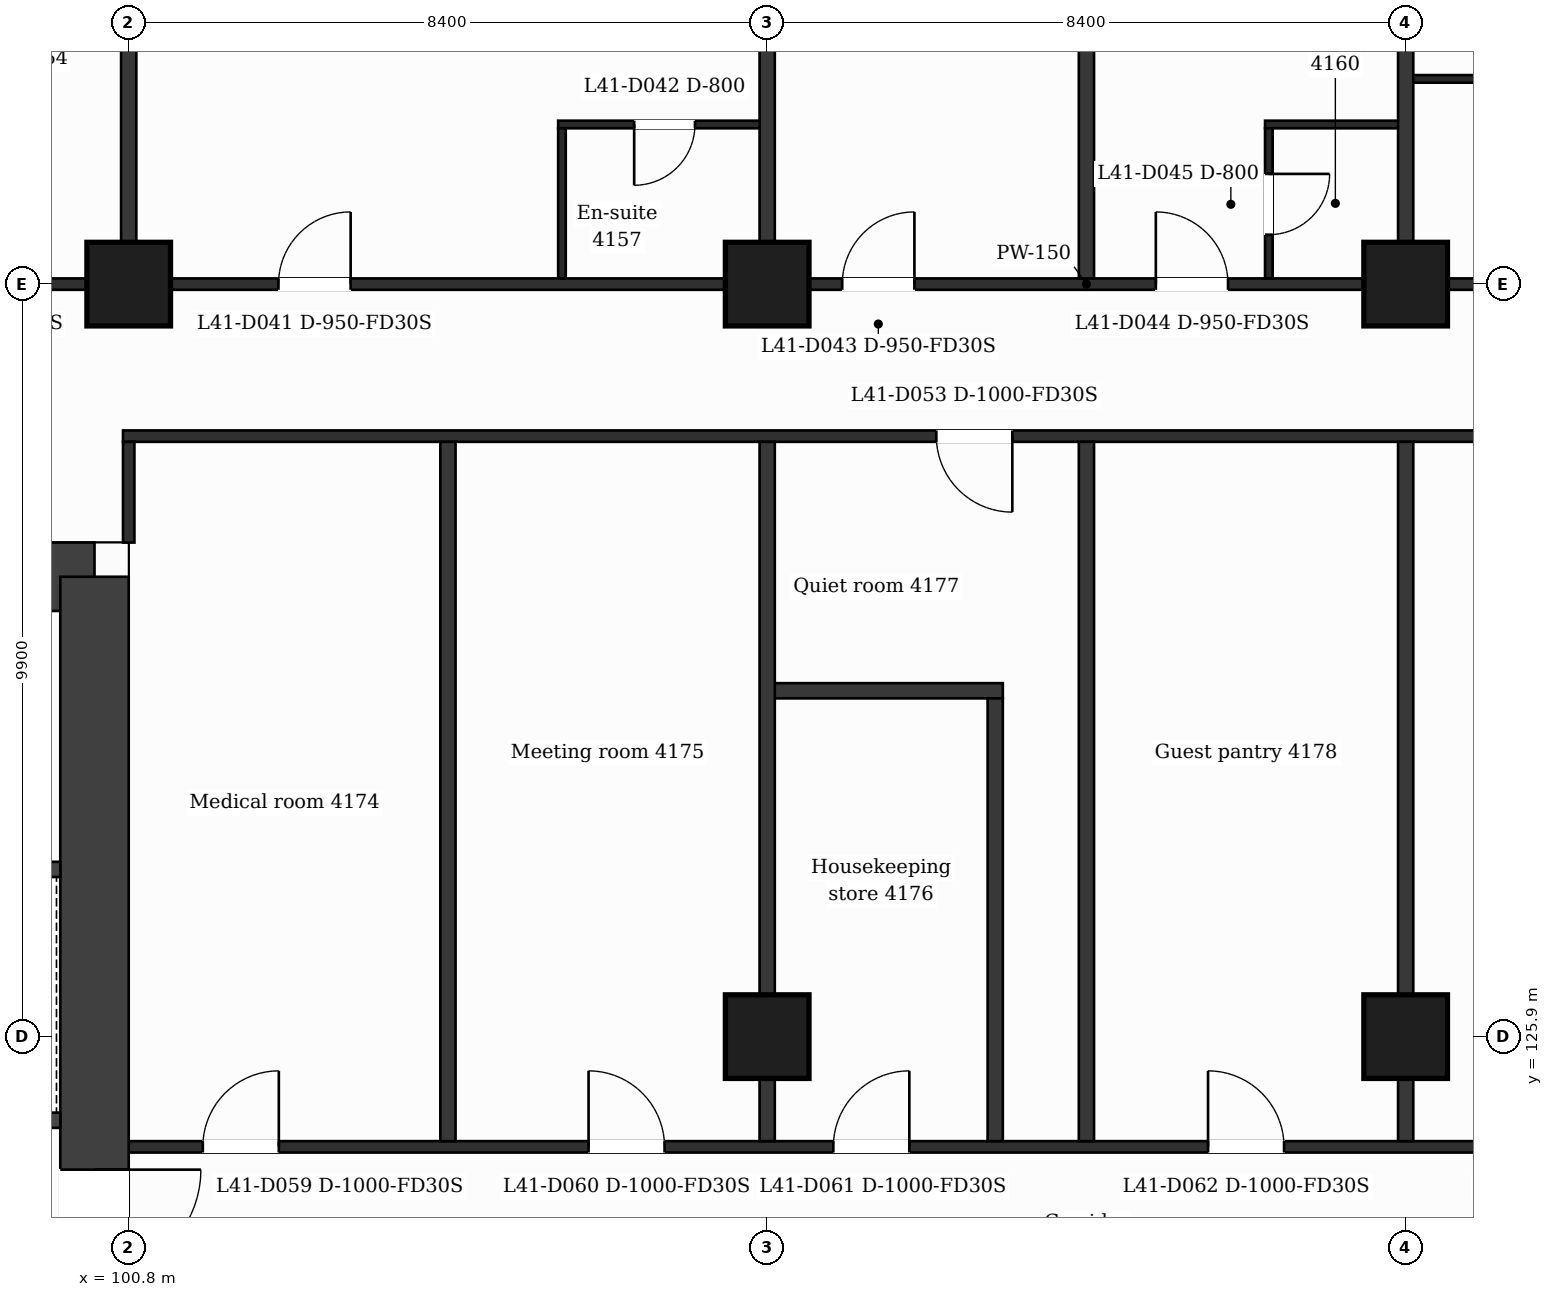
"""IFC4 building model, lengths in metres.
Left out: names, types, materials, properties, quantities, classifications, styles, units other than length and angle.
Written with IfcOpenShell. Run it as: python <this file> out.ifc"""

import sys

from ifc_helpers import new_model, si_unit, direction, frame, frame_2d, origin, origin_2d, place, context, subcontext, project, spatial, rectangle, extrude, element, fill, save


model = new_model("IFC4")
c1 = context("Model", 3, precision=1e-05, world=origin(), true_north=direction((0.0, 1.0)))
c2 = subcontext(c1, "Body", "Model", "MODEL_VIEW")
j1 = project(units=[si_unit("LENGTHUNIT", "METRE"), si_unit("PLANEANGLEUNIT", "RADIAN")], contexts=[c1])
p1 = place(None, origin())
s1 = spatial("IfcSite", under=j1, at=p1, CompositionType="ELEMENT")
p2 = place(p1, origin())
s2 = spatial("IfcBuilding", under=s1, at=p2, CompositionType="ELEMENT")
p3 = place(p2, frame((0.0, 0.0, 173.7)))
s3 = spatial("IfcBuildingStorey", under=s2, at=p3, CompositionType="ELEMENT", Elevation=173.7)
p4 = place(p3, frame((89.024, 131.95, 0.0), z_axis=(0.0, 0.0, 1.0), x_axis=(1.0, 0.0, 0.0)))
e1 = element("IfcWall", 1, at=p4, inside=s3, PredefinedType="SHEAR", context=c2, shape_type="SweptSolid", body=[
    extrude(rectangle(XDim=11.326, YDim=0.9, at=frame_2d((5.663, 0.0))), origin(), (0.0, 0.0, 1.0), 3.7),
])
p5 = place(p4, frame((6.739, 0.0, 0.0)))
e2 = element("IfcOpeningElement", 2, at=p5, cuts=e1, PredefinedType="OPENING", context=c2, shape_type="SweptSolid", body=[
    extrude(rectangle(XDim=1.2, YDim=2.1, at=frame_2d((0.6, 1.05))), frame((0.0, 0.46, 0.0), z_axis=(0.0, -1.0, 0.0), x_axis=(1.0, 0.0, 0.0)), (0.0, 0.0, 1.0), 0.92),
])
p6 = place(p3, frame((100.35, 131.95, 0.0), z_axis=(0.0, 0.0, 1.0), x_axis=(0.0, -1.0, 0.0)))
e3 = element("IfcWall", 3, at=p6, inside=s3, PredefinedType="SHEAR", context=c2, shape_type="SweptSolid", body=[
    extrude(rectangle(XDim=21.1, YDim=0.9, at=frame_2d((10.55, 0.0))), origin(), (0.0, 0.0, 1.0), 3.7),
])
p7 = place(p6, frame((7.8, 0.0, 0.0)))
e4 = element("IfcOpeningElement", 4, at=p7, cuts=e3, PredefinedType="OPENING", context=c2, shape_type="SweptSolid", body=[
    extrude(rectangle(XDim=1.4, YDim=2.1, at=frame_2d((0.7, 1.05))), frame((0.0, 0.46, 0.0), z_axis=(0.0, -1.0, 0.0), x_axis=(1.0, 0.0, 0.0)), (0.0, 0.0, 1.0), 0.92),
])
for number, where, z_axis, x_axis in (
    (5, (109.2, 125.9, 0.0), (0.0, 0.0, 1.0), (1.0, 0.0, 0.0)),
    (6, (117.6, 125.9, 0.0), (0.0, 0.0, 1.0), (1.0, 0.0, 0.0)),
    (7, (100.8, 135.8, 0.0), (0.0, 0.0, 1.0), (1.0, 0.0, 0.0)),
    (8, (109.2, 135.8, 0.0), (0.0, 0.0, 1.0), (1.0, 0.0, 0.0)),
    (9, (117.6, 135.8, 0.0), (0.0, 0.0, 1.0), (1.0, 0.0, 0.0)),
):
    element("IfcColumn", number, at=place(p3, frame(where, z_axis=z_axis, x_axis=x_axis)), inside=s3, PredefinedType="COLUMN", context=c2, shape_type="SweptSolid", body=[
        extrude(rectangle(XDim=1.1, YDim=1.1, at=origin_2d()), origin(), (0.0, 0.0, 1.0), 3.7),
    ])
p8 = place(p3, frame((100.8, 124.45, 0.0), z_axis=(0.0, 0.0, 1.0), x_axis=(1.0, 0.0, 0.0)))
e10 = element("IfcWall", 10, at=p8, inside=s3, PredefinedType="PARTITIONING", context=c2, shape_type="SweptSolid", body=[
    extrude(rectangle(XDim=25.2, YDim=0.15, at=frame_2d((12.6, 0.0))), origin(), (0.0, 0.0, 1.0), 3.38),
])
p9 = place(p8, frame((0.975, 0.0, 0.0)))
e11 = element("IfcOpeningElement", 11, at=p9, cuts=e10, PredefinedType="OPENING", context=c2, shape_type="SweptSolid", body=[
    extrude(rectangle(XDim=1.0, YDim=2.1, at=frame_2d((0.5, 1.05))), frame((0.0, 0.085, 0.0), z_axis=(0.0, -1.0, 0.0), x_axis=(1.0, 0.0, 0.0)), (0.0, 0.0, 1.0), 0.17),
])
p10 = place(p8, frame((6.05, 0.0, 0.0)))
e12 = element("IfcOpeningElement", 12, at=p10, cuts=e10, PredefinedType="OPENING", context=c2, shape_type="SweptSolid", body=[
    extrude(rectangle(XDim=1.0, YDim=2.1, at=frame_2d((0.5, 1.05))), frame((0.0, 0.085, 0.0), z_axis=(0.0, -1.0, 0.0), x_axis=(1.0, 0.0, 0.0)), (0.0, 0.0, 1.0), 0.17),
])
p11 = place(p8, frame((9.27, 0.0, 0.0)))
e13 = element("IfcOpeningElement", 13, at=p11, cuts=e10, PredefinedType="OPENING", context=c2, shape_type="SweptSolid", body=[
    extrude(rectangle(XDim=1.0, YDim=2.1, at=frame_2d((0.5, 1.05))), frame((0.0, 0.085, 0.0), z_axis=(0.0, -1.0, 0.0), x_axis=(1.0, 0.0, 0.0)), (0.0, 0.0, 1.0), 0.17),
])
p12 = place(p8, frame((14.2, 0.0, 0.0)))
e14 = element("IfcOpeningElement", 14, at=p12, cuts=e10, PredefinedType="OPENING", context=c2, shape_type="SweptSolid", body=[
    extrude(rectangle(XDim=1.0, YDim=2.1, at=frame_2d((0.5, 1.05))), frame((0.0, 0.085, 0.0), z_axis=(0.0, -1.0, 0.0), x_axis=(1.0, 0.0, 0.0)), (0.0, 0.0, 1.0), 0.17),
])
p13 = place(p8, frame((18.825, 0.0, 0.0)))
e15 = element("IfcOpeningElement", 15, at=p13, cuts=e10, PredefinedType="OPENING", context=c2, shape_type="SweptSolid", body=[
    extrude(rectangle(XDim=1.0, YDim=2.1, at=frame_2d((0.5, 1.05))), frame((0.0, 0.085, 0.0), z_axis=(0.0, -1.0, 0.0), x_axis=(1.0, 0.0, 0.0)), (0.0, 0.0, 1.0), 0.17),
])
p14 = place(p3, frame((92.702, 124.8, 0.0), z_axis=(0.0, 0.0, 1.0), x_axis=(1.0, 0.0, 0.0)))
e16 = element("IfcWall", 16, at=p14, inside=s3, PredefinedType="PARTITIONING", context=c2, shape_type="SweptSolid", body=[
    extrude(rectangle(XDim=7.198, YDim=0.2, at=frame_2d((3.599, 0.0))), origin(), (0.0, 0.0, 1.0), 3.38),
])
p15 = place(p14, frame((5.469, 0.0, 0.0)))
e17 = element("IfcOpeningElement", 17, at=p15, cuts=e16, PredefinedType="OPENING", context=c2, shape_type="SweptSolid", body=[
    extrude(rectangle(XDim=1.1, YDim=2.1, at=frame_2d((0.55, 1.05))), frame((0.0, 0.11, 0.0), z_axis=(0.0, -1.0, 0.0), x_axis=(1.0, 0.0, 0.0)), (0.0, 0.0, 1.0), 0.22),
])
p16 = place(p3, frame((92.827, 128.1, 0.0), z_axis=(0.0, 0.0, 1.0), x_axis=(1.0, 0.0, 0.0)))
e18 = element("IfcWall", 18, at=p16, inside=s3, PredefinedType="PARTITIONING", context=c2, shape_type="SweptSolid", body=[
    extrude(rectangle(XDim=7.073, YDim=0.2, at=frame_2d((3.537, 0.0))), origin(), (0.0, 0.0, 1.0), 3.38),
])
p17 = place(p16, frame((2.847, 0.0, 0.0)))
e19 = element("IfcOpeningElement", 19, at=p17, cuts=e18, PredefinedType="OPENING", context=c2, shape_type="SweptSolid", body=[
    extrude(rectangle(XDim=1.1, YDim=2.1, at=frame_2d((0.55, 1.05))), frame((0.0, 0.11, 0.0), z_axis=(0.0, -1.0, 0.0), x_axis=(1.0, 0.0, 0.0)), (0.0, 0.0, 1.0), 0.22),
])
p18 = place(p3, frame((109.2, 130.45, 0.0), z_axis=(0.0, 0.0, 1.0), x_axis=(1.0, 0.0, 0.0)))
e20 = element("IfcWall", 20, at=p18, inside=s3, PredefinedType="PARTITIONING", context=c2, shape_type="SweptSolid", body=[
    extrude(rectangle(XDim=3.1, YDim=0.2, at=frame_2d((1.55, 0.0))), origin(), (0.0, 0.0, 1.0), 3.38),
])
p19 = place(p3, frame((100.725, 133.8, 0.0), z_axis=(0.0, 0.0, 1.0), x_axis=(1.0, 0.0, 0.0)))
e21 = element("IfcWall", 21, at=p19, inside=s3, PredefinedType="PARTITIONING", context=c2, shape_type="SweptSolid", body=[
    extrude(rectangle(XDim=25.35, YDim=0.15, at=frame_2d((12.675, 0.0))), origin(), (0.0, 0.0, 1.0), 3.38),
])
p20 = place(p19, frame((10.7, 0.0, 0.0)))
e22 = element("IfcOpeningElement", 22, at=p20, cuts=e21, PredefinedType="OPENING", context=c2, shape_type="SweptSolid", body=[
    extrude(rectangle(XDim=1.0, YDim=2.1, at=frame_2d((0.5, 1.05))), frame((0.0, 0.085, 0.0), z_axis=(0.0, -1.0, 0.0), x_axis=(1.0, 0.0, 0.0)), (0.0, 0.0, 1.0), 0.17),
])
p21 = place(p3, frame((90.895, 135.8, 0.0), z_axis=(0.0, 0.0, 1.0), x_axis=(1.0, 0.0, 0.0)))
e23 = element("IfcWall", 23, at=p21, inside=s3, PredefinedType="PARTITIONING", context=c2, shape_type="SweptSolid", body=[
    extrude(rectangle(XDim=45.011, YDim=0.15, at=frame_2d((22.505, 0.0))), origin(), (0.0, 0.0, 1.0), 3.38),
])
p22 = place(p21, frame((6.906, 0.0, 0.0)))
e24 = element("IfcOpeningElement", 24, at=p22, cuts=e23, PredefinedType="OPENING", context=c2, shape_type="SweptSolid", body=[
    extrude(rectangle(XDim=1.0, YDim=2.1, at=frame_2d((0.5, 1.05))), frame((0.0, 0.085, 0.0), z_axis=(0.0, -1.0, 0.0), x_axis=(1.0, 0.0, 0.0)), (0.0, 0.0, 1.0), 0.17),
])
p23 = place(p21, frame((11.875, 0.0, 0.0)))
e25 = element("IfcOpeningElement", 25, at=p23, cuts=e23, PredefinedType="OPENING", context=c2, shape_type="SweptSolid", body=[
    extrude(rectangle(XDim=0.95, YDim=2.1, at=frame_2d((0.475, 1.05))), frame((0.0, 0.085, 0.0), z_axis=(0.0, -1.0, 0.0), x_axis=(1.0, 0.0, 0.0)), (0.0, 0.0, 1.0), 0.17),
])
p24 = place(p21, frame((19.292, 0.0, 0.0)))
e26 = element("IfcOpeningElement", 26, at=p24, cuts=e23, PredefinedType="OPENING", context=c2, shape_type="SweptSolid", body=[
    extrude(rectangle(XDim=0.95, YDim=2.1, at=frame_2d((0.475, 1.05))), frame((0.0, 0.085, 0.0), z_axis=(0.0, -1.0, 0.0), x_axis=(1.0, 0.0, 0.0)), (0.0, 0.0, 1.0), 0.17),
])
p25 = place(p21, frame((23.418, 0.0, 0.0)))
e27 = element("IfcOpeningElement", 27, at=p25, cuts=e23, PredefinedType="OPENING", context=c2, shape_type="SweptSolid", body=[
    extrude(rectangle(XDim=0.95, YDim=2.1, at=frame_2d((0.475, 1.05))), frame((0.0, 0.085, 0.0), z_axis=(0.0, -1.0, 0.0), x_axis=(1.0, 0.0, 0.0)), (0.0, 0.0, 1.0), 0.17),
])
p26 = place(p21, frame((29.425, 0.0, 0.0)))
e28 = element("IfcOpeningElement", 28, at=p26, cuts=e23, PredefinedType="OPENING", context=c2, shape_type="SweptSolid", body=[
    extrude(rectangle(XDim=0.95, YDim=2.1, at=frame_2d((0.475, 1.05))), frame((0.0, 0.085, 0.0), z_axis=(0.0, -1.0, 0.0), x_axis=(1.0, 0.0, 0.0)), (0.0, 0.0, 1.0), 0.17),
])
p27 = place(p21, frame((31.63, 0.0, 0.0)))
e29 = element("IfcOpeningElement", 29, at=p27, cuts=e23, PredefinedType="OPENING", context=c2, shape_type="SweptSolid", body=[
    extrude(rectangle(XDim=0.95, YDim=2.1, at=frame_2d((0.475, 1.05))), frame((0.0, 0.085, 0.0), z_axis=(0.0, -1.0, 0.0), x_axis=(1.0, 0.0, 0.0)), (0.0, 0.0, 1.0), 0.17),
])
p28 = place(p21, frame((36.775, 0.0, 0.0)))
e30 = element("IfcOpeningElement", 30, at=p28, cuts=e23, PredefinedType="OPENING", context=c2, shape_type="SweptSolid", body=[
    extrude(rectangle(XDim=1.0, YDim=2.1, at=frame_2d((0.5, 1.05))), frame((0.0, 0.085, 0.0), z_axis=(0.0, -1.0, 0.0), x_axis=(1.0, 0.0, 0.0)), (0.0, 0.0, 1.0), 0.17),
])
p29 = place(p3, frame((106.45, 137.9, 0.0), z_axis=(0.0, 0.0, 1.0), x_axis=(1.0, 0.0, 0.0)))
e31 = element("IfcWall", 31, at=p29, inside=s3, PredefinedType="PARTITIONING", context=c2, shape_type="SweptSolid", body=[
    extrude(rectangle(XDim=2.75, YDim=0.1, at=frame_2d((1.375, 0.0))), origin(), (0.0, 0.0, 1.0), 3.38),
])
p30 = place(p29, frame((1.0, 0.0, 0.0)))
e32 = element("IfcOpeningElement", 32, at=p30, cuts=e31, PredefinedType="OPENING", context=c2, shape_type="SweptSolid", body=[
    extrude(rectangle(XDim=0.8, YDim=2.1, at=frame_2d((0.4, 1.05))), frame((0.0, 0.06, 0.0), z_axis=(0.0, -1.0, 0.0), x_axis=(1.0, 0.0, 0.0)), (0.0, 0.0, 1.0), 0.12),
])
p31 = place(p3, frame((115.75, 137.9, 0.0), z_axis=(0.0, 0.0, 1.0), x_axis=(1.0, 0.0, 0.0)))
e33 = element("IfcWall", 33, at=p31, inside=s3, PredefinedType="PARTITIONING", context=c2, shape_type="SweptSolid", body=[
    extrude(rectangle(XDim=1.85, YDim=0.1, at=frame_2d((0.925, 0.0))), origin(), (0.0, 0.0, 1.0), 3.38),
])
p32 = place(p3, frame((117.6, 138.5, 0.0), z_axis=(0.0, 0.0, 1.0), x_axis=(1.0, 0.0, 0.0)))
e34 = element("IfcWall", 34, at=p32, inside=s3, PredefinedType="PARTITIONING", context=c2, shape_type="SweptSolid", body=[
    extrude(rectangle(XDim=2.15, YDim=0.1, at=frame_2d((1.075, 0.0))), origin(), (0.0, 0.0, 1.0), 3.38),
])
p33 = place(p3, frame((100.8, 135.875, 0.0), z_axis=(0.0, 0.0, 1.0), x_axis=(0.0, 1.0, 0.0)))
e35 = element("IfcWall", 35, at=p33, inside=s3, PredefinedType="PARTITIONING", context=c2, shape_type="SweptSolid", body=[
    extrude(rectangle(XDim=7.135, YDim=0.2, at=frame_2d((3.567, 0.0))), origin(), (0.0, 0.0, 1.0), 3.38),
])
p34 = place(p3, frame((100.8, 132.4, 0.0), z_axis=(0.0, 0.0, 1.0), x_axis=(0.0, 1.0, 0.0)))
e36 = element("IfcWall", 36, at=p34, inside=s3, PredefinedType="PARTITIONING", context=c2, shape_type="SweptSolid", body=[
    extrude(rectangle(XDim=1.325, YDim=0.15, at=frame_2d((0.663, 0.0))), origin(), (0.0, 0.0, 1.0), 3.38),
])
p35 = place(p3, frame((105.0, 124.525, 0.0), z_axis=(0.0, 0.0, 1.0), x_axis=(0.0, 1.0, 0.0)))
e37 = element("IfcWall", 37, at=p35, inside=s3, PredefinedType="PARTITIONING", context=c2, shape_type="SweptSolid", body=[
    extrude(rectangle(XDim=9.2, YDim=0.2, at=frame_2d((4.6, 0.0))), origin(), (0.0, 0.0, 1.0), 3.38),
])
p36 = place(p3, frame((106.5, 135.875, 0.0), z_axis=(0.0, 0.0, 1.0), x_axis=(0.0, 1.0, 0.0)))
e38 = element("IfcWall", 38, at=p36, inside=s3, PredefinedType="PARTITIONING", context=c2, shape_type="SweptSolid", body=[
    extrude(rectangle(XDim=1.975, YDim=0.1, at=frame_2d((0.988, 0.0))), origin(), (0.0, 0.0, 1.0), 3.38),
])
p37 = place(p3, frame((109.2, 124.525, 0.0), z_axis=(0.0, 0.0, 1.0), x_axis=(0.0, 1.0, 0.0)))
e39 = element("IfcWall", 39, at=p37, inside=s3, PredefinedType="PARTITIONING", context=c2, shape_type="SweptSolid", body=[
    extrude(rectangle(XDim=9.2, YDim=0.2, at=frame_2d((4.6, 0.0))), origin(), (0.0, 0.0, 1.0), 3.38),
])
p38 = place(p3, frame((109.2, 135.875, 0.0), z_axis=(0.0, 0.0, 1.0), x_axis=(0.0, 1.0, 0.0)))
e40 = element("IfcWall", 40, at=p38, inside=s3, PredefinedType="PARTITIONING", context=c2, shape_type="SweptSolid", body=[
    extrude(rectangle(XDim=7.135, YDim=0.2, at=frame_2d((3.567, 0.0))), origin(), (0.0, 0.0, 1.0), 3.38),
])
p39 = place(p3, frame((112.2, 124.525, 0.0), z_axis=(0.0, 0.0, 1.0), x_axis=(0.0, 1.0, 0.0)))
e41 = element("IfcWall", 41, at=p39, inside=s3, PredefinedType="PARTITIONING", context=c2, shape_type="SweptSolid", body=[
    extrude(rectangle(XDim=5.825, YDim=0.2, at=frame_2d((2.913, 0.0))), origin(), (0.0, 0.0, 1.0), 3.38),
])
p40 = place(p3, frame((113.4, 124.525, 0.0), z_axis=(0.0, 0.0, 1.0), x_axis=(0.0, 1.0, 0.0)))
e42 = element("IfcWall", 42, at=p40, inside=s3, PredefinedType="PARTITIONING", context=c2, shape_type="SweptSolid", body=[
    extrude(rectangle(XDim=9.2, YDim=0.2, at=frame_2d((4.6, 0.0))), origin(), (0.0, 0.0, 1.0), 3.38),
])
p41 = place(p3, frame((113.4, 135.875, 0.0), z_axis=(0.0, 0.0, 1.0), x_axis=(0.0, 1.0, 0.0)))
e43 = element("IfcWall", 43, at=p41, inside=s3, PredefinedType="PARTITIONING", context=c2, shape_type="SweptSolid", body=[
    extrude(rectangle(XDim=8.085, YDim=0.2, at=frame_2d((4.042, 0.0))), origin(), (0.0, 0.0, 1.0), 3.38),
])
p42 = place(p3, frame((115.8, 135.875, 0.0), z_axis=(0.0, 0.0, 1.0), x_axis=(0.0, 1.0, 0.0)))
e44 = element("IfcWall", 44, at=p42, inside=s3, PredefinedType="PARTITIONING", context=c2, shape_type="SweptSolid", body=[
    extrude(rectangle(XDim=1.975, YDim=0.1, at=frame_2d((0.988, 0.0))), origin(), (0.0, 0.0, 1.0), 3.38),
])
p43 = place(p42, frame((0.575, 0.0, 0.0)))
e45 = element("IfcOpeningElement", 45, at=p43, cuts=e44, PredefinedType="OPENING", context=c2, shape_type="SweptSolid", body=[
    extrude(rectangle(XDim=0.8, YDim=2.1, at=frame_2d((0.4, 1.05))), frame((0.0, 0.06, 0.0), z_axis=(0.0, -1.0, 0.0), x_axis=(1.0, 0.0, 0.0)), (0.0, 0.0, 1.0), 0.12),
])
p44 = place(p3, frame((117.6, 124.525, 0.0), z_axis=(0.0, 0.0, 1.0), x_axis=(0.0, 1.0, 0.0)))
e46 = element("IfcWall", 46, at=p44, inside=s3, PredefinedType="PARTITIONING", context=c2, shape_type="SweptSolid", body=[
    extrude(rectangle(XDim=9.2, YDim=0.2, at=frame_2d((4.6, 0.0))), origin(), (0.0, 0.0, 1.0), 3.38),
])
p45 = place(p3, frame((117.6, 135.875, 0.0), z_axis=(0.0, 0.0, 1.0), x_axis=(0.0, 1.0, 0.0)))
e47 = element("IfcWall", 47, at=p45, inside=s3, PredefinedType="PARTITIONING", context=c2, shape_type="SweptSolid", body=[
    extrude(rectangle(XDim=7.135, YDim=0.2, at=frame_2d((3.567, 0.0))), origin(), (0.0, 0.0, 1.0), 3.38),
])
p46 = place(p23, origin())
e48 = element("IfcDoor", 48, at=p46, inside=s3, OperationType="SINGLE_SWING_RIGHT", PredefinedType="DOOR", context=c2, shape_type="SweptSolid", body=[
    extrude(rectangle(XDim=0.95, YDim=2.1, at=frame_2d((0.475, 1.05))), frame((0.0, 0.025, 0.0), z_axis=(0.0, -1.0, 0.0), x_axis=(1.0, 0.0, 0.0)), (0.0, 0.0, 1.0), 0.05),
])
fill(e25, e48)
p47 = place(p30, origin())
e49 = element("IfcDoor", 49, at=p47, inside=s3, OperationType="SINGLE_SWING_LEFT", PredefinedType="DOOR", context=c2, shape_type="SweptSolid", body=[
    extrude(rectangle(XDim=0.8, YDim=2.1, at=frame_2d((0.4, 1.05))), frame((0.0, 0.025, 0.0), z_axis=(0.0, -1.0, 0.0), x_axis=(1.0, 0.0, 0.0)), (0.0, 0.0, 1.0), 0.05),
])
fill(e32, e49)
p48 = place(p24, origin())
e50 = element("IfcDoor", 50, at=p48, inside=s3, OperationType="SINGLE_SWING_RIGHT", PredefinedType="DOOR", context=c2, shape_type="SweptSolid", body=[
    extrude(rectangle(XDim=0.95, YDim=2.1, at=frame_2d((0.475, 1.05))), frame((0.0, 0.025, 0.0), z_axis=(0.0, -1.0, 0.0), x_axis=(1.0, 0.0, 0.0)), (0.0, 0.0, 1.0), 0.05),
])
fill(e26, e50)
p49 = place(p25, origin())
e51 = element("IfcDoor", 51, at=p49, inside=s3, OperationType="SINGLE_SWING_LEFT", PredefinedType="DOOR", context=c2, shape_type="SweptSolid", body=[
    extrude(rectangle(XDim=0.95, YDim=2.1, at=frame_2d((0.475, 1.05))), frame((0.0, 0.025, 0.0), z_axis=(0.0, -1.0, 0.0), x_axis=(1.0, 0.0, 0.0)), (0.0, 0.0, 1.0), 0.05),
])
fill(e27, e51)
p50 = place(p43, origin())
e52 = element("IfcDoor", 52, at=p50, inside=s3, OperationType="SINGLE_SWING_RIGHT", PredefinedType="DOOR", context=c2, shape_type="SweptSolid", body=[
    extrude(rectangle(XDim=0.8, YDim=2.1, at=frame_2d((0.4, 1.05))), frame((0.0, 0.025, 0.0), z_axis=(0.0, -1.0, 0.0), x_axis=(1.0, 0.0, 0.0)), (0.0, 0.0, 1.0), 0.05),
])
fill(e45, e52)
p51 = place(p20, origin())
e53 = element("IfcDoor", 53, at=p51, inside=s3, OperationType="SINGLE_SWING_RIGHT", PredefinedType="DOOR", context=c2, shape_type="SweptSolid", body=[
    extrude(rectangle(XDim=1.0, YDim=2.1, at=frame_2d((0.5, 1.05))), frame((0.0, 0.025, 0.0), z_axis=(0.0, -1.0, 0.0), x_axis=(1.0, 0.0, 0.0)), (0.0, 0.0, 1.0), 0.05),
])
fill(e22, e53)
p52 = place(p9, origin())
e54 = element("IfcDoor", 54, at=p52, inside=s3, OperationType="SINGLE_SWING_RIGHT", PredefinedType="DOOR", context=c2, shape_type="SweptSolid", body=[
    extrude(rectangle(XDim=1.0, YDim=2.1, at=frame_2d((0.5, 1.05))), frame((0.0, 0.025, 0.0), z_axis=(0.0, -1.0, 0.0), x_axis=(1.0, 0.0, 0.0)), (0.0, 0.0, 1.0), 0.05),
])
fill(e11, e54)
p53 = place(p10, origin())
e55 = element("IfcDoor", 55, at=p53, inside=s3, OperationType="SINGLE_SWING_LEFT", PredefinedType="DOOR", context=c2, shape_type="SweptSolid", body=[
    extrude(rectangle(XDim=1.0, YDim=2.1, at=frame_2d((0.5, 1.05))), frame((0.0, 0.025, 0.0), z_axis=(0.0, -1.0, 0.0), x_axis=(1.0, 0.0, 0.0)), (0.0, 0.0, 1.0), 0.05),
])
fill(e12, e55)
p54 = place(p11, origin())
e56 = element("IfcDoor", 56, at=p54, inside=s3, OperationType="SINGLE_SWING_RIGHT", PredefinedType="DOOR", context=c2, shape_type="SweptSolid", body=[
    extrude(rectangle(XDim=1.0, YDim=2.1, at=frame_2d((0.5, 1.05))), frame((0.0, 0.025, 0.0), z_axis=(0.0, -1.0, 0.0), x_axis=(1.0, 0.0, 0.0)), (0.0, 0.0, 1.0), 0.05),
])
fill(e13, e56)
p55 = place(p12, origin())
e57 = element("IfcDoor", 57, at=p55, inside=s3, OperationType="SINGLE_SWING_LEFT", PredefinedType="DOOR", context=c2, shape_type="SweptSolid", body=[
    extrude(rectangle(XDim=1.0, YDim=2.1, at=frame_2d((0.5, 1.05))), frame((0.0, 0.025, 0.0), z_axis=(0.0, -1.0, 0.0), x_axis=(1.0, 0.0, 0.0)), (0.0, 0.0, 1.0), 0.05),
])
fill(e14, e57)
p56 = place(p7, origin())
e58 = element("IfcDoor", 58, at=p56, inside=s3, OperationType="SINGLE_SWING_LEFT", PredefinedType="DOOR", context=c2, shape_type="SweptSolid", body=[
    extrude(rectangle(XDim=1.4, YDim=2.1, at=frame_2d((0.7, 1.05))), frame((0.0, 0.025, 0.0), z_axis=(0.0, -1.0, 0.0), x_axis=(1.0, 0.0, 0.0)), (0.0, 0.0, 1.0), 0.05),
])
fill(e4, e58)
save(model, sys.argv[1])
